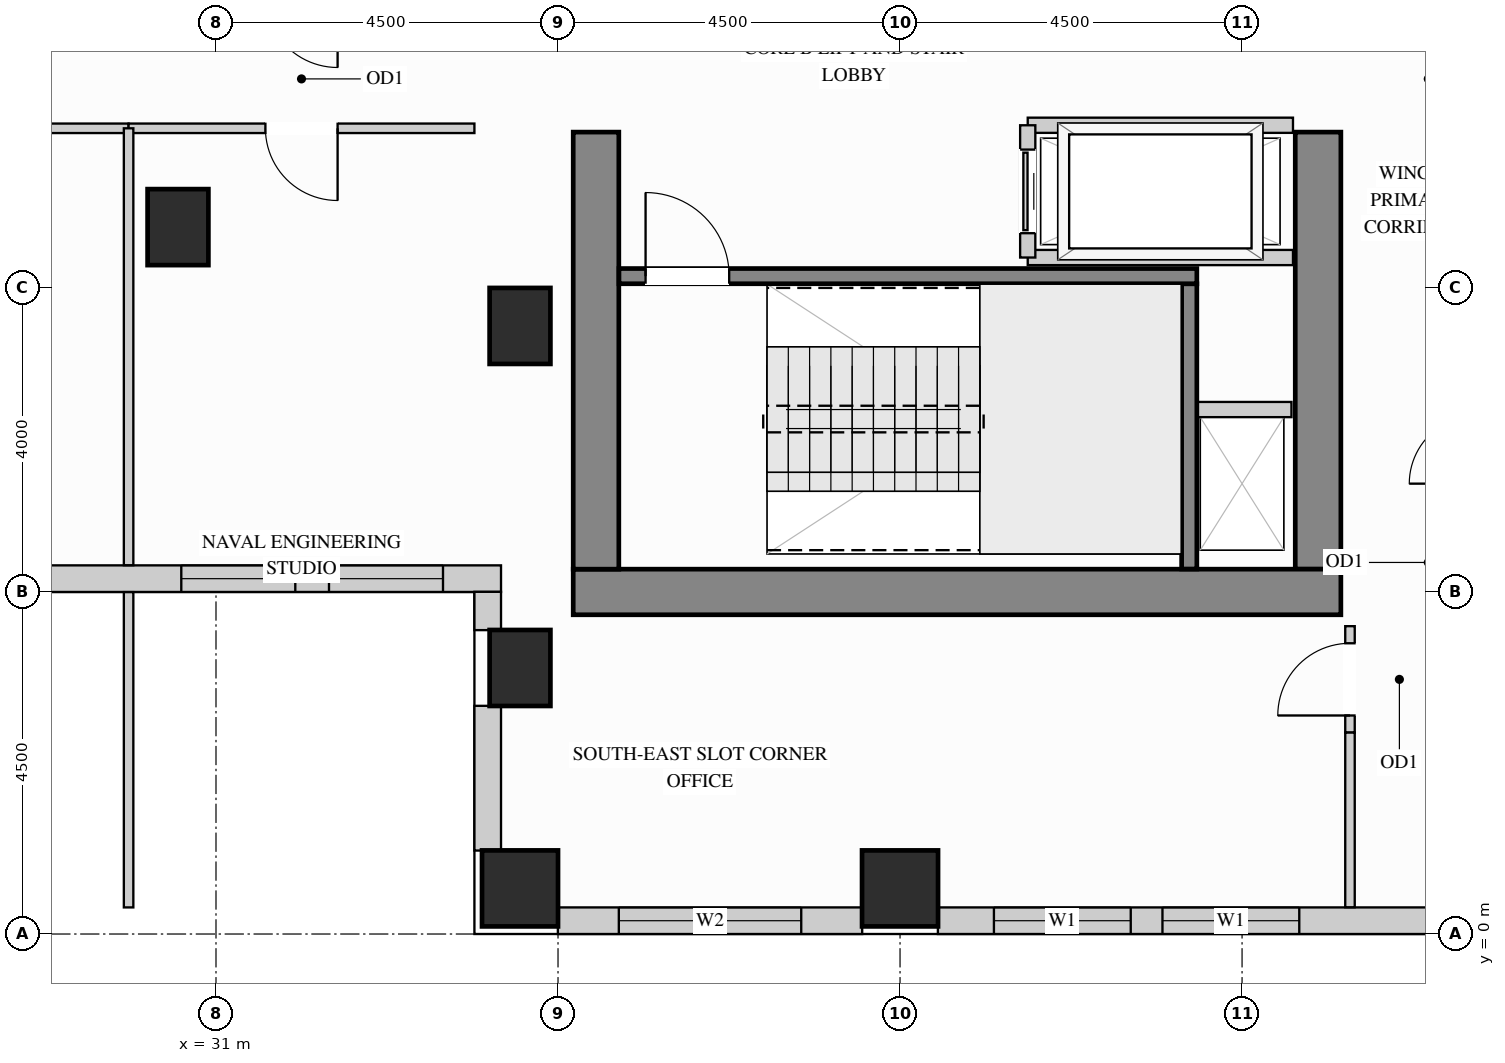
"""IFC4 building model, lengths in metres.
Left out: names, types, materials, properties, quantities, classifications, styles, units other than length and angle.
Written with IfcOpenShell. Run it as: python <this file> out.ifc"""

import sys

from ifc_helpers import new_model, si_unit, direction, frame, frame_2d, origin, origin_2d, place, context, subcontext, project, spatial, rectangle, extrude, source, transform, mapped, element, fill, save


model = new_model("IFC4")
c1 = context("Model", 3, precision=1e-05, world=origin(), true_north=direction((0.0, 1.0)))
c2 = subcontext(c1, "Body", "Model", "MODEL_VIEW")
j1 = project(units=[si_unit("LENGTHUNIT", "METRE"), si_unit("PLANEANGLEUNIT", "RADIAN")], contexts=[c1])
p1 = place(None, origin())
s1 = spatial("IfcSite", under=j1, at=p1, CompositionType="ELEMENT")
p2 = place(p1, origin())
s2 = spatial("IfcBuilding", under=s1, at=p2, CompositionType="ELEMENT")
p3 = place(p2, frame((0.0, 0.0, 150.3)))
s3 = spatial("IfcBuildingStorey", under=s2, at=p3, CompositionType="ELEMENT", Elevation=150.3)
m1 = source(origin(), c2, "Body", "SweptSolid", [
    extrude(rectangle(XDim=0.8, YDim=1.0, at=origin_2d()), origin(), (0.0, 0.0, 1.0), 3.4),
])
for number, where, z_axis, x_axis in (
    (1, (35.0, 3.5, 0.0), (0.0, 0.0, 1.0), (1.0, 0.0, 0.0)),
    (2, (35.0, 8.0, 0.0), (0.0, 0.0, 1.0), (1.0, 0.0, 0.0)),
    (3, (30.5, 9.3, 0.0), (0.0, 0.0, 1.0), (1.0, 0.0, 0.0)),
):
    element("IfcColumn", number, at=place(p3, frame(where, z_axis=z_axis, x_axis=x_axis)), inside=s3, PredefinedType="COLUMN", context=c2, shape_type="MappedRepresentation", body=[
        mapped(m1, transform((0.0, 0.0, 0.0), x_axis=(1.0, 0.0, 0.0), y_axis=(0.0, 1.0, 0.0), z_axis=(0.0, 0.0, 1.0))),
    ])
m2 = source(origin(), c2, "Body", "SweptSolid", [
    extrude(rectangle(XDim=1.0, YDim=1.0, at=origin_2d()), origin(), (0.0, 0.0, 1.0), 3.4),
])
for number, where, z_axis, x_axis in (
    (4, (35.0, 0.6, 0.0), (0.0, 0.0, 1.0), (1.0, 0.0, 0.0)),
    (5, (40.0, 0.6, 0.0), (0.0, 0.0, 1.0), (1.0, 0.0, 0.0)),
):
    element("IfcColumn", number, at=place(p3, frame(where, z_axis=z_axis, x_axis=x_axis)), inside=s3, PredefinedType="COLUMN", context=c2, shape_type="MappedRepresentation", body=[
        mapped(m2, transform((0.0, 0.0, 0.0), x_axis=(1.0, 0.0, 0.0), y_axis=(0.0, 1.0, 0.0), z_axis=(0.0, 0.0, 1.0))),
    ])
m3 = source(origin(), c2, "Body", "SweptSolid", [
    extrude(rectangle(XDim=5.75, YDim=0.6, at=frame_2d((2.875, 0.0))), origin(), (0.0, 0.0, 1.0), 3.4),
])
p4 = place(p3, frame((45.5, 4.8, 0.0), z_axis=(0.0, 0.0, 1.0), x_axis=(0.0, 1.0, 0.0)))
e6 = element("IfcWall", 6, at=p4, inside=s3, PredefinedType="SHEAR", context=c2, shape_type="MappedRepresentation", body=[
    mapped(m3, transform((0.0, 0.0, 0.0), x_axis=(1.0, 0.0, 0.0), y_axis=(0.0, 1.0, 0.0), z_axis=(0.0, 0.0, 1.0))),
])
m4 = source(origin(), c2, "Body", "SweptSolid", [
    extrude(rectangle(XDim=10.1, YDim=0.6, at=frame_2d((5.05, 0.0))), origin(), (0.0, 0.0, 1.0), 3.4),
])
p5 = place(p3, frame((35.7, 4.5, 0.0), z_axis=(0.0, 0.0, 1.0), x_axis=(1.0, 0.0, 0.0)))
e7 = element("IfcWall", 7, at=p5, inside=s3, PredefinedType="SHEAR", context=c2, shape_type="MappedRepresentation", body=[
    mapped(m4, transform((0.0, 0.0, 0.0), x_axis=(1.0, 0.0, 0.0), y_axis=(0.0, 1.0, 0.0), z_axis=(0.0, 0.0, 1.0))),
])
p6 = place(p3, frame((36.0, 4.8, 0.0), z_axis=(0.0, 0.0, 1.0), x_axis=(0.0, 1.0, 0.0)))
e8 = element("IfcWall", 8, at=p6, inside=s3, PredefinedType="SHEAR", context=c2, shape_type="MappedRepresentation", body=[
    mapped(m3, transform((0.0, 0.0, 0.0), x_axis=(1.0, 0.0, 0.0), y_axis=(0.0, 1.0, 0.0), z_axis=(0.0, 0.0, 1.0))),
])
p7 = place(p3, frame((19.15, 4.675, 0.0), z_axis=(0.0, 0.0, 1.0), x_axis=(1.0, 0.0, 0.0)))
e9 = element("IfcWall", 9, at=p7, inside=s3, PredefinedType="SOLIDWALL", context=c2, shape_type="SweptSolid", body=[
    extrude(rectangle(XDim=15.6, YDim=0.35, at=frame_2d((7.8, 0.0))), origin(), (0.0, 0.0, 1.0), 3.385),
])
p8 = place(p7, frame((0.697, 0.0, 0.78)))
e10 = element("IfcOpeningElement", 10, at=p8, cuts=e9, PredefinedType="OPENING", context=c2, shape_type="SweptSolid", body=[
    extrude(rectangle(XDim=1.5, YDim=2.0, at=frame_2d((0.75, 1.0))), frame((0.0, 0.185, 0.0), z_axis=(0.0, -1.0, 0.0), x_axis=(1.0, 0.0, 0.0)), (0.0, 0.0, 1.0), 0.37),
])
p9 = place(p7, frame((2.573, 0.0, 0.78)))
e11 = element("IfcOpeningElement", 11, at=p9, cuts=e9, PredefinedType="OPENING", context=c2, shape_type="SweptSolid", body=[
    extrude(rectangle(XDim=1.5, YDim=2.0, at=frame_2d((0.75, 1.0))), frame((0.0, 0.185, 0.0), z_axis=(0.0, -1.0, 0.0), x_axis=(1.0, 0.0, 0.0)), (0.0, 0.0, 1.0), 0.37),
])
p10 = place(p7, frame((5.783, 0.0, 0.78)))
e12 = element("IfcOpeningElement", 12, at=p10, cuts=e9, PredefinedType="OPENING", context=c2, shape_type="SweptSolid", body=[
    extrude(rectangle(XDim=1.5, YDim=2.0, at=frame_2d((0.75, 1.0))), frame((0.0, 0.185, 0.0), z_axis=(0.0, -1.0, 0.0), x_axis=(1.0, 0.0, 0.0)), (0.0, 0.0, 1.0), 0.37),
])
p11 = place(p7, frame((8.117, 0.0, 0.78)))
e13 = element("IfcOpeningElement", 13, at=p11, cuts=e9, PredefinedType="OPENING", context=c2, shape_type="SweptSolid", body=[
    extrude(rectangle(XDim=1.5, YDim=2.0, at=frame_2d((0.75, 1.0))), frame((0.0, 0.185, 0.0), z_axis=(0.0, -1.0, 0.0), x_axis=(1.0, 0.0, 0.0)), (0.0, 0.0, 1.0), 0.37),
])
p12 = place(p7, frame((11.393, 0.0, 0.78)))
e14 = element("IfcOpeningElement", 14, at=p12, cuts=e9, PredefinedType="OPENING", context=c2, shape_type="SweptSolid", body=[
    extrude(rectangle(XDim=1.5, YDim=2.0, at=frame_2d((0.75, 1.0))), frame((0.0, 0.185, 0.0), z_axis=(0.0, -1.0, 0.0), x_axis=(1.0, 0.0, 0.0)), (0.0, 0.0, 1.0), 0.37),
])
p13 = place(p7, frame((13.337, 0.0, 0.78)))
e15 = element("IfcOpeningElement", 15, at=p13, cuts=e9, PredefinedType="OPENING", context=c2, shape_type="SweptSolid", body=[
    extrude(rectangle(XDim=1.5, YDim=2.0, at=frame_2d((0.75, 1.0))), frame((0.0, 0.185, 0.0), z_axis=(0.0, -1.0, 0.0), x_axis=(1.0, 0.0, 0.0)), (0.0, 0.0, 1.0), 0.37),
])
m5 = source(origin(), c2, "Body", "SweptSolid", [
    extrude(rectangle(XDim=0.504, YDim=0.35, at=frame_2d((0.252, 0.0))), origin(), (0.0, 0.0, 1.0), 3.385),
])
p14 = place(p3, frame((34.575, 4.502, 0.0), z_axis=(0.0, 0.0, 1.0), x_axis=(0.0, -1.0, 0.0)))
e16 = element("IfcWall", 16, at=p14, inside=s3, PredefinedType="SOLIDWALL", context=c2, shape_type="MappedRepresentation", body=[
    mapped(m5, transform((0.0, 0.0, 0.0), x_axis=(1.0, 0.0, 0.0), y_axis=(0.0, 1.0, 0.0), z_axis=(0.0, 0.0, 1.0))),
])
m6 = source(origin(), c2, "Body", "SweptSolid", [
    extrude(rectangle(XDim=1.904, YDim=0.35, at=frame_2d((0.952, 0.0))), origin(), (0.0, 0.0, 1.0), 2.612),
])
p15 = place(p3, frame((34.575, 3.002, 0.0), z_axis=(0.0, 0.0, 1.0), x_axis=(0.0, -1.0, 0.0)))
e17 = element("IfcWall", 17, at=p15, inside=s3, PredefinedType="SOLIDWALL", context=c2, shape_type="MappedRepresentation", body=[
    mapped(m6, transform((0.0, 0.0, 0.0), x_axis=(1.0, 0.0, 0.0), y_axis=(0.0, 1.0, 0.0), z_axis=(0.0, 0.0, 1.0))),
])
p16 = place(p3, frame((35.498, 0.175, 0.0), z_axis=(0.0, 0.0, 1.0), x_axis=(1.0, 0.0, 0.0)))
e18 = element("IfcWall", 18, at=p16, inside=s3, PredefinedType="SOLIDWALL", context=c2, shape_type="SweptSolid", body=[
    extrude(rectangle(XDim=4.004, YDim=0.35, at=frame_2d((2.002, 0.0))), origin(), (0.0, 0.0, 1.0), 2.612),
])
p17 = place(p16, frame((0.802, 0.0, 0.78)))
e19 = element("IfcOpeningElement", 19, at=p17, cuts=e18, PredefinedType="OPENING", context=c2, shape_type="SweptSolid", body=[
    extrude(rectangle(XDim=2.4, YDim=1.652, at=frame_2d((1.2, 0.826))), frame((0.0, 0.185, 0.0), z_axis=(0.0, -1.0, 0.0), x_axis=(1.0, 0.0, 0.0)), (0.0, 0.0, 1.0), 0.37),
])
p18 = place(p3, frame((40.498, 0.175, 0.0), z_axis=(0.0, 0.0, 1.0), x_axis=(1.0, 0.0, 0.0)))
e20 = element("IfcWall", 20, at=p18, inside=s3, PredefinedType="SOLIDWALL", context=c2, shape_type="SweptSolid", body=[
    extrude(rectangle(XDim=6.604, YDim=0.35, at=frame_2d((3.302, 0.0))), origin(), (0.0, 0.0, 1.0), 2.612),
])
p19 = place(p18, frame((0.737, 0.0, 0.78)))
e21 = element("IfcOpeningElement", 21, at=p19, cuts=e20, PredefinedType="OPENING", context=c2, shape_type="SweptSolid", body=[
    extrude(rectangle(XDim=1.8, YDim=1.652, at=frame_2d((0.9, 0.826))), frame((0.0, 0.185, 0.0), z_axis=(0.0, -1.0, 0.0), x_axis=(1.0, 0.0, 0.0)), (0.0, 0.0, 1.0), 0.37),
])
p20 = place(p18, frame((2.955, 0.0, 0.78)))
e22 = element("IfcOpeningElement", 22, at=p20, cuts=e20, PredefinedType="OPENING", context=c2, shape_type="SweptSolid", body=[
    extrude(rectangle(XDim=1.8, YDim=1.652, at=frame_2d((0.9, 0.826))), frame((0.0, 0.185, 0.0), z_axis=(0.0, -1.0, 0.0), x_axis=(1.0, 0.0, 0.0)), (0.0, 0.0, 1.0), 0.37),
])
p21 = place(p3, frame((45.92, 2.65, 0.0), z_axis=(0.0, 0.0, 1.0), x_axis=(0.0, 1.0, 0.0)))
e23 = element("IfcWall", 23, at=p21, inside=s3, PredefinedType="PARTITIONING", context=c2, shape_type="SweptSolid", body=[
    extrude(rectangle(XDim=1.4, YDim=0.125, at=frame_2d((0.7, 0.0))), origin(), (0.0, 0.0, 1.0), 3.385),
])
p22 = place(p21, frame((0.225, 0.0, 0.0)))
e24 = element("IfcOpeningElement", 24, at=p22, cuts=e23, PredefinedType="OPENING", context=c2, shape_type="SweptSolid", body=[
    extrude(rectangle(XDim=0.95, YDim=2.15, at=frame_2d((0.475, 1.075))), frame((0.0, 0.073, 0.0), z_axis=(0.0, -1.0, 0.0), x_axis=(1.0, 0.0, 0.0)), (0.0, 0.0, 1.0), 0.145),
])
m7 = source(origin(), c2, "Body", "SweptSolid", [
    extrude(rectangle(XDim=2.298, YDim=0.125, at=frame_2d((1.149, 0.0))), origin(), (0.0, 0.0, 1.0), 3.385),
])
p23 = place(p3, frame((45.92, 0.352, 0.0), z_axis=(0.0, 0.0, 1.0), x_axis=(0.0, 1.0, 0.0)))
e25 = element("IfcWall", 25, at=p23, inside=s3, PredefinedType="PARTITIONING", context=c2, shape_type="MappedRepresentation", body=[
    mapped(m7, transform((0.0, 0.0, 0.0), x_axis=(1.0, 0.0, 0.0), y_axis=(0.0, 1.0, 0.0), z_axis=(0.0, 0.0, 1.0))),
])
p24 = place(p3, frame((23.85, 10.6, 0.0), z_axis=(0.0, 0.0, 1.0), x_axis=(1.0, 0.0, 0.0)))
e26 = element("IfcWall", 26, at=p24, inside=s3, PredefinedType="PARTITIONING", context=c2, shape_type="SweptSolid", body=[
    extrude(rectangle(XDim=6.0, YDim=0.125, at=frame_2d((3.0, 0.0))), origin(), (0.0, 0.0, 1.0), 3.385),
])
p25 = place(p24, frame((2.525, 0.0, 0.0)))
e27 = element("IfcOpeningElement", 27, at=p25, cuts=e26, PredefinedType="OPENING", context=c2, shape_type="SweptSolid", body=[
    extrude(rectangle(XDim=0.95, YDim=2.15, at=frame_2d((0.475, 1.075))), frame((0.0, 0.073, 0.0), z_axis=(0.0, -1.0, 0.0), x_axis=(1.0, 0.0, 0.0)), (0.0, 0.0, 1.0), 0.145),
])
p26 = place(p3, frame((29.85, 10.6, 0.0), z_axis=(0.0, 0.0, 1.0), x_axis=(1.0, 0.0, 0.0)))
e28 = element("IfcWall", 28, at=p26, inside=s3, PredefinedType="PARTITIONING", context=c2, shape_type="SweptSolid", body=[
    extrude(rectangle(XDim=4.55, YDim=0.125, at=frame_2d((2.275, 0.0))), origin(), (0.0, 0.0, 1.0), 3.385),
])
p27 = place(p26, frame((1.8, 0.0, 0.0)))
e29 = element("IfcOpeningElement", 29, at=p27, cuts=e28, PredefinedType="OPENING", context=c2, shape_type="SweptSolid", body=[
    extrude(rectangle(XDim=0.95, YDim=2.15, at=frame_2d((0.475, 1.075))), frame((0.0, 0.073, 0.0), z_axis=(0.0, -1.0, 0.0), x_axis=(1.0, 0.0, 0.0)), (0.0, 0.0, 1.0), 0.145),
])
m8 = source(origin(), c2, "Body", "SweptSolid", [
    extrude(rectangle(XDim=4.148, YDim=0.125, at=frame_2d((2.074, 0.0))), origin(), (0.0, 0.0, 1.0), 3.385),
])
p28 = place(p3, frame((29.85, 0.35, 0.0), z_axis=(0.0, 0.0, 1.0), x_axis=(0.0, 1.0, 0.0)))
e30 = element("IfcWall", 30, at=p28, inside=s3, PredefinedType="PARTITIONING", context=c2, shape_type="MappedRepresentation", body=[
    mapped(m8, transform((0.0, 0.0, 0.0), x_axis=(1.0, 0.0, 0.0), y_axis=(0.0, 1.0, 0.0), z_axis=(0.0, 0.0, 1.0))),
])
m9 = source(origin(), c2, "Body", "SweptSolid", [
    extrude(rectangle(XDim=5.748, YDim=0.125, at=frame_2d((2.874, 0.0))), origin(), (0.0, 0.0, 1.0), 3.385),
])
p29 = place(p3, frame((29.85, 4.852, 0.0), z_axis=(0.0, 0.0, 1.0), x_axis=(0.0, 1.0, 0.0)))
e31 = element("IfcWall", 31, at=p29, inside=s3, PredefinedType="PARTITIONING", context=c2, shape_type="MappedRepresentation", body=[
    mapped(m9, transform((0.0, 0.0, 0.0), x_axis=(1.0, 0.0, 0.0), y_axis=(0.0, 1.0, 0.0), z_axis=(0.0, 0.0, 1.0))),
])
m10 = source(origin(), c2, "Body", "SweptSolid", [
    extrude(rectangle(XDim=1.3, YDim=0.2, at=frame_2d((0.65, 0.0))), origin(), (0.0, 0.0, 1.0), 3.385),
])
p30 = place(p3, frame((43.85, 6.9, 0.0), z_axis=(0.0, 0.0, 1.0), x_axis=(1.0, 0.0, 0.0)))
e32 = element("IfcWall", 32, at=p30, inside=s3, PredefinedType="PARTITIONING", context=c2, shape_type="MappedRepresentation", body=[
    mapped(m10, transform((0.0, 0.0, 0.0), x_axis=(1.0, 0.0, 0.0), y_axis=(0.0, 1.0, 0.0), z_axis=(0.0, 0.0, 1.0))),
])
m11 = source(origin(), c2, "Body", "SweptSolid", [
    extrude(rectangle(XDim=3.49, YDim=0.2, at=frame_2d((1.745, 0.0))), origin(), (0.0, 0.0, 1.0), 3.385),
])
for number, where, z_axis, x_axis in (
    (33, (41.68, 10.64, 0.0), (0.0, 0.0, 1.0), (1.0, 0.0, 0.0)),
    (34, (41.68, 8.9, 0.0), (0.0, 0.0, 1.0), (1.0, 0.0, 0.0)),
):
    element("IfcWall", number, at=place(p3, frame(where, z_axis=z_axis, x_axis=x_axis)), inside=s3, PredefinedType="PARTITIONING", context=c2, shape_type="MappedRepresentation", body=[
        mapped(m11, transform((0.0, 0.0, 0.0), x_axis=(1.0, 0.0, 0.0), y_axis=(0.0, 1.0, 0.0), z_axis=(0.0, 0.0, 1.0))),
    ])
p31 = place(p3, frame((41.68, 8.9, 0.0), z_axis=(0.0, 0.0, 1.0), x_axis=(0.0, 1.0, 0.0)))
e35 = element("IfcWall", 35, at=p31, inside=s3, PredefinedType="PARTITIONING", context=c2, shape_type="SweptSolid", body=[
    extrude(rectangle(XDim=1.74, YDim=0.2, at=frame_2d((0.87, 0.0))), origin(), (0.0, 0.0, 1.0), 3.385),
])
p32 = place(p31, frame((0.32, 0.0, 0.0)))
e36 = element("IfcOpeningElement", 36, at=p32, cuts=e35, PredefinedType="OPENING", context=c2, shape_type="SweptSolid", body=[
    extrude(rectangle(XDim=1.1, YDim=2.2, at=frame_2d((0.55, 1.1))), frame((0.0, 0.11, 0.0), z_axis=(0.0, -1.0, 0.0), x_axis=(1.0, 0.0, 0.0)), (0.0, 0.0, 1.0), 0.22),
])
m12 = source(origin(), c2, "Body", "SweptSolid", [
    extrude(rectangle(XDim=3.753, YDim=0.2, at=frame_2d((1.876, 0.0))), origin(), (0.0, 0.0, 1.0), 3.4),
])
p33 = place(p3, frame((43.805, 4.802, 0.0), z_axis=(0.0, 0.0, 1.0), x_axis=(0.0, 1.0, 0.0)))
e37 = element("IfcWall", 37, at=p33, inside=s3, PredefinedType="SHEAR", context=c2, shape_type="MappedRepresentation", body=[
    mapped(m12, transform((0.0, 0.0, 0.0), x_axis=(1.0, 0.0, 0.0), y_axis=(0.0, 1.0, 0.0), z_axis=(0.0, 0.0, 1.0))),
])
p34 = place(p3, frame((36.302, 8.655, 0.0), z_axis=(0.0, 0.0, 1.0), x_axis=(1.0, 0.0, 0.0)))
e38 = element("IfcWall", 38, at=p34, inside=s3, PredefinedType="SHEAR", context=c2, shape_type="SweptSolid", body=[
    extrude(rectangle(XDim=7.603, YDim=0.2, at=frame_2d((3.802, 0.0))), origin(), (0.0, 0.0, 1.0), 3.4),
])
p35 = place(p34, frame((0.35, 0.0, 0.0)))
e39 = element("IfcOpeningElement", 39, at=p35, cuts=e38, PredefinedType="OPENING", context=c2, shape_type="SweptSolid", body=[
    extrude(rectangle(XDim=1.1, YDim=2.15, at=frame_2d((0.55, 1.075))), frame((0.0, 0.11, 0.0), z_axis=(0.0, -1.0, 0.0), x_axis=(1.0, 0.0, 0.0)), (0.0, 0.0, 1.0), 0.22),
])
m13 = source(origin(), c2, "Body", "SweptSolid", [
    extrude(rectangle(XDim=1.1, YDim=2.2, at=frame_2d((0.55, 1.1))), frame((0.0, 0.025, 0.0), z_axis=(0.0, -1.0, 0.0), x_axis=(1.0, 0.0, 0.0)), (0.0, 0.0, 1.0), 0.05),
])
p36 = place(p32, origin())
e40 = element("IfcDoor", 40, at=p36, inside=s3, OperationType="SLIDING_TO_LEFT", PredefinedType="DOOR", context=c2, shape_type="MappedRepresentation", body=[
    mapped(m13, transform((0.0, 0.0, 0.0), x_axis=(1.0, 0.0, 0.0), y_axis=(0.0, 1.0, 0.0), z_axis=(0.0, 0.0, 1.0))),
])
fill(e36, e40)
m14 = source(origin(), c2, "Body", "SweptSolid", [
    extrude(rectangle(XDim=0.95, YDim=2.15, at=frame_2d((0.475, 1.075))), frame((0.0, 0.025, 0.0), z_axis=(0.0, -1.0, 0.0), x_axis=(1.0, 0.0, 0.0)), (0.0, 0.0, 1.0), 0.05),
])
p37 = place(p22, origin())
e41 = element("IfcDoor", 41, at=p37, inside=s3, OperationType="SINGLE_SWING_LEFT", PredefinedType="DOOR", context=c2, shape_type="MappedRepresentation", body=[
    mapped(m14, transform((0.0, 0.0, 0.0), x_axis=(1.0, 0.0, 0.0), y_axis=(0.0, 1.0, 0.0), z_axis=(0.0, 0.0, 1.0))),
])
fill(e24, e41)
p38 = place(p27, origin())
e42 = element("IfcDoor", 42, at=p38, inside=s3, OperationType="SINGLE_SWING_RIGHT", PredefinedType="DOOR", context=c2, shape_type="MappedRepresentation", body=[
    mapped(m14, transform((0.0, 0.0, 0.0), x_axis=(1.0, 0.0, 0.0), y_axis=(0.0, 1.0, 0.0), z_axis=(0.0, 0.0, 1.0))),
])
fill(e29, e42)
m15 = source(origin(), c2, "Body", "SweptSolid", [
    extrude(rectangle(XDim=1.1, YDim=2.15, at=frame_2d((0.55, 1.075))), frame((0.0, 0.025, 0.0), z_axis=(0.0, -1.0, 0.0), x_axis=(1.0, 0.0, 0.0)), (0.0, 0.0, 1.0), 0.05),
])
p39 = place(p35, origin())
e43 = element("IfcDoor", 43, at=p39, inside=s3, OperationType="SINGLE_SWING_LEFT", PredefinedType="DOOR", context=c2, shape_type="MappedRepresentation", body=[
    mapped(m15, transform((0.0, 0.0, 0.0), x_axis=(1.0, 0.0, 0.0), y_axis=(0.0, 1.0, 0.0), z_axis=(0.0, 0.0, 1.0))),
])
fill(e39, e43)
m16 = source(origin(), c2, "Body", "SweptSolid", [
    extrude(rectangle(XDim=1.8, YDim=1.652, at=frame_2d((0.9, 0.826))), frame((0.0, 0.03, 0.0), z_axis=(0.0, -1.0, 0.0), x_axis=(1.0, 0.0, 0.0)), (0.0, 0.0, 1.0), 0.06),
])
p40 = place(p19, origin())
e44 = element("IfcWindow", 44, at=p40, inside=s3, PartitioningType="SINGLE_PANEL", PredefinedType="WINDOW", context=c2, shape_type="MappedRepresentation", body=[
    mapped(m16, transform((0.0, 0.0, 0.0), x_axis=(1.0, 0.0, 0.0), y_axis=(0.0, 1.0, 0.0), z_axis=(0.0, 0.0, 1.0))),
])
fill(e21, e44)
p41 = place(p20, origin())
e45 = element("IfcWindow", 45, at=p41, inside=s3, PartitioningType="SINGLE_PANEL", PredefinedType="WINDOW", context=c2, shape_type="MappedRepresentation", body=[
    mapped(m16, transform((0.0, 0.0, 0.0), x_axis=(1.0, 0.0, 0.0), y_axis=(0.0, 1.0, 0.0), z_axis=(0.0, 0.0, 1.0))),
])
fill(e22, e45)
m17 = source(origin(), c2, "Body", "SweptSolid", [
    extrude(rectangle(XDim=2.4, YDim=1.652, at=frame_2d((1.2, 0.826))), frame((0.0, 0.03, 0.0), z_axis=(0.0, -1.0, 0.0), x_axis=(1.0, 0.0, 0.0)), (0.0, 0.0, 1.0), 0.06),
])
p42 = place(p17, origin())
e46 = element("IfcWindow", 46, at=p42, inside=s3, PartitioningType="SINGLE_PANEL", PredefinedType="WINDOW", context=c2, shape_type="MappedRepresentation", body=[
    mapped(m17, transform((0.0, 0.0, 0.0), x_axis=(1.0, 0.0, 0.0), y_axis=(0.0, 1.0, 0.0), z_axis=(0.0, 0.0, 1.0))),
])
fill(e19, e46)
m18 = source(origin(), c2, "Body", "SweptSolid", [
    extrude(rectangle(XDim=1.5, YDim=2.0, at=frame_2d((0.75, 1.0))), frame((0.0, 0.03, 0.0), z_axis=(0.0, -1.0, 0.0), x_axis=(1.0, 0.0, 0.0)), (0.0, 0.0, 1.0), 0.06),
])
p43 = place(p12, origin())
e47 = element("IfcWindow", 47, at=p43, inside=s3, PartitioningType="SINGLE_PANEL", PredefinedType="WINDOW", context=c2, shape_type="MappedRepresentation", body=[
    mapped(m18, transform((0.0, 0.0, 0.0), x_axis=(1.0, 0.0, 0.0), y_axis=(0.0, 1.0, 0.0), z_axis=(0.0, 0.0, 1.0))),
])
fill(e14, e47)
p44 = place(p13, origin())
e48 = element("IfcWindow", 48, at=p44, inside=s3, PartitioningType="SINGLE_PANEL", PredefinedType="WINDOW", context=c2, shape_type="MappedRepresentation", body=[
    mapped(m18, transform((0.0, 0.0, 0.0), x_axis=(1.0, 0.0, 0.0), y_axis=(0.0, 1.0, 0.0), z_axis=(0.0, 0.0, 1.0))),
])
fill(e15, e48)
save(model, sys.argv[1])
